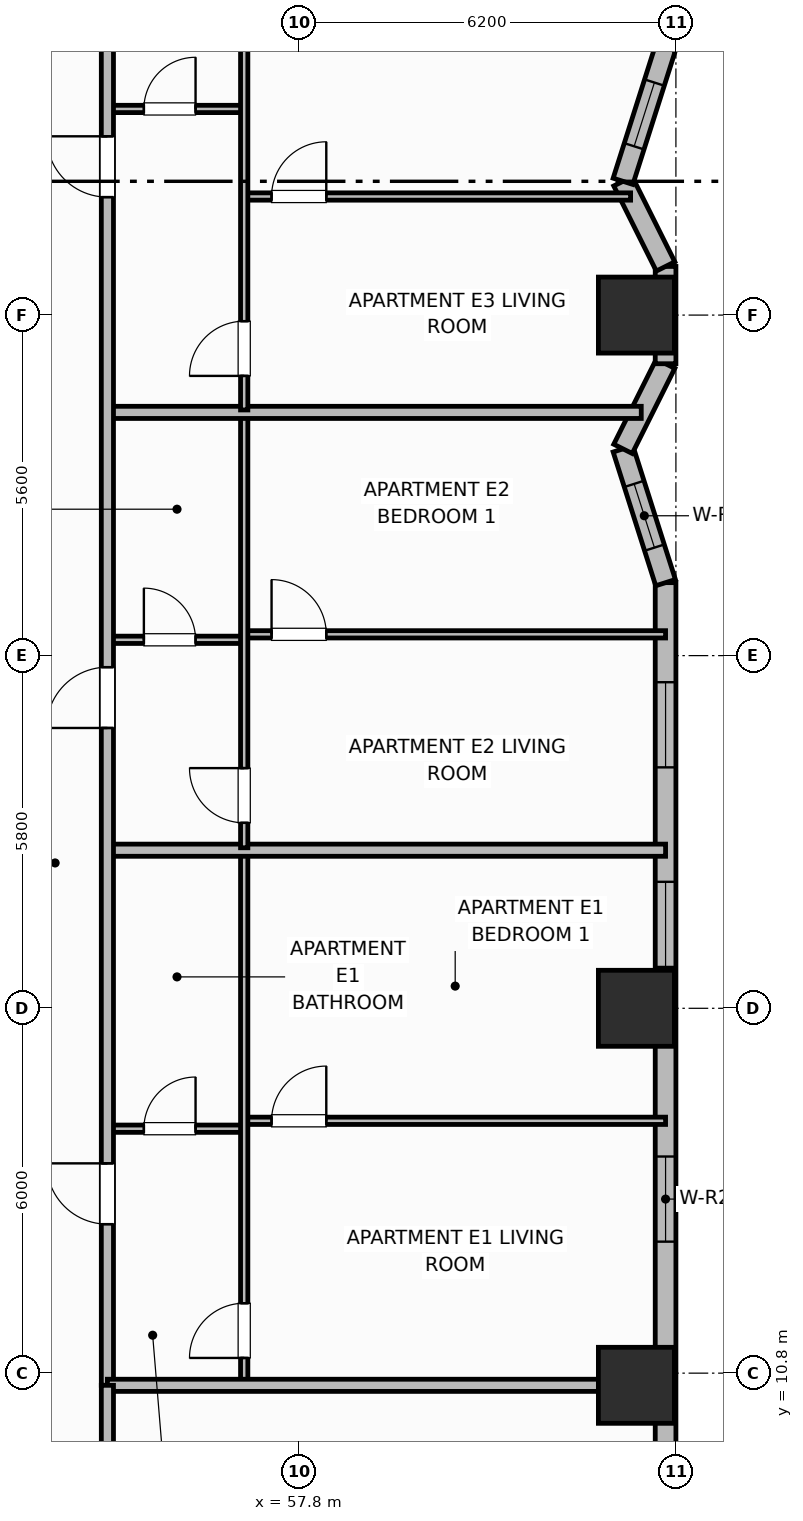
"""IFC4 building model, lengths in metres.
Left out: names, types, materials, properties, quantities, classifications, styles, units other than length and angle.
Written with IfcOpenShell. Run it as: python <this file> out.ifc"""

import sys

from ifc_helpers import new_model, si_unit, direction, frame, frame_2d, origin, origin_2d, place, context, subcontext, project, spatial, rectangle, extrude, element, fill, save


model = new_model("IFC4")
c1 = context("Model", 3, precision=1e-05, world=origin(), true_north=direction((0.0, 1.0)))
c2 = subcontext(c1, "Body", "Model", "MODEL_VIEW")
j1 = project(units=[si_unit("LENGTHUNIT", "METRE"), si_unit("PLANEANGLEUNIT", "RADIAN")], contexts=[c1])
p1 = place(None, origin())
s1 = spatial("IfcSite", under=j1, at=p1, CompositionType="ELEMENT")
p2 = place(p1, origin())
s2 = spatial("IfcBuilding", under=s1, at=p2, CompositionType="ELEMENT")
p3 = place(p2, frame((0.0, 0.0, 65.8)))
s3 = spatial("IfcBuildingStorey", under=s2, at=p3, CompositionType="ELEMENT", Elevation=65.8)
for number, where, z_axis, x_axis in (
    (1, (63.35, 10.6, 0.0), (0.0, 0.0, 1.0), (1.0, 0.0, 0.0)),
    (2, (63.35, 16.8, 0.0), (0.0, 0.0, 1.0), (1.0, 0.0, 0.0)),
    (3, (63.35, 28.2, 0.0), (0.0, 0.0, 1.0), (1.0, 0.0, 0.0)),
):
    element("IfcColumn", number, at=place(p3, frame(where, z_axis=z_axis, x_axis=x_axis)), inside=s3, PredefinedType="COLUMN", context=c2, shape_type="SweptSolid", body=[
        extrude(rectangle(XDim=1.25, YDim=1.25, at=origin_2d()), origin(), (0.0, 0.0, 1.0), 3.7),
    ])
p4 = place(p3, frame((63.83, 9.0, 0.0), z_axis=(0.0, 0.0, 1.0), x_axis=(0.0, 1.0, 0.0)))
e4 = element("IfcWall", 4, at=p4, inside=s3, PredefinedType="SOLIDWALL", context=c2, shape_type="SweptSolid", body=[
    extrude(rectangle(XDim=14.8, YDim=0.34, at=frame_2d((7.4, 0.0))), origin(), (0.0, 0.0, 1.0), 2.7),
])
p5 = place(p4, frame((3.962, 0.0, 0.73)))
e5 = element("IfcOpeningElement", 5, at=p5, cuts=e4, PredefinedType="OPENING", context=c2, shape_type="SweptSolid", body=[
    extrude(rectangle(XDim=1.4, YDim=1.85, at=frame_2d((0.7, 0.925))), frame((0.0, 0.18, 0.0), z_axis=(0.0, -1.0, 0.0), x_axis=(1.0, 0.0, 0.0)), (0.0, 0.0, 1.0), 0.36),
])
p6 = place(p4, frame((8.48, 0.0, 0.69)))
e6 = element("IfcOpeningElement", 6, at=p6, cuts=e4, PredefinedType="OPENING", context=c2, shape_type="SweptSolid", body=[
    extrude(rectangle(XDim=1.4, YDim=1.85, at=frame_2d((0.7, 0.925))), frame((0.0, 0.18, 0.0), z_axis=(0.0, -1.0, 0.0), x_axis=(1.0, 0.0, 0.0)), (0.0, 0.0, 1.0), 0.36),
])
p7 = place(p4, frame((11.762, 0.0, 0.73)))
e7 = element("IfcOpeningElement", 7, at=p7, cuts=e4, PredefinedType="OPENING", context=c2, shape_type="SweptSolid", body=[
    extrude(rectangle(XDim=1.4, YDim=1.85, at=frame_2d((0.7, 0.925))), frame((0.0, 0.18, 0.0), z_axis=(0.0, -1.0, 0.0), x_axis=(1.0, 0.0, 0.0)), (0.0, 0.0, 1.0), 0.36),
])
p8 = place(p3, frame((63.83, 23.8, 0.0), z_axis=(0.0, 0.0, 1.0), x_axis=(-0.303286588318, 0.95289938889, 0.0)))
e8 = element("IfcWall", 8, at=p8, inside=s3, PredefinedType="SOLIDWALL", context=c2, shape_type="SweptSolid", body=[
    extrude(rectangle(XDim=2.309, YDim=0.34, at=frame_2d((1.154, 0.0))), origin(), (0.0, 0.0, 1.0), 2.7),
])
p9 = place(p8, frame((0.604, 0.0, 0.89)))
e9 = element("IfcOpeningElement", 9, at=p9, cuts=e8, PredefinedType="OPENING", context=c2, shape_type="SweptSolid", body=[
    extrude(rectangle(XDim=1.1, YDim=1.65, at=frame_2d((0.55, 0.825))), frame((0.0, 0.18, 0.0), z_axis=(0.0, -1.0, 0.0), x_axis=(1.0, 0.0, 0.0)), (0.0, 0.0, 1.0), 0.36),
])
p10 = place(p3, frame((63.13, 26.0, 0.0), z_axis=(0.0, 0.0, 1.0), x_axis=(0.447338371726, 0.894364792007, 0.0)))
e10 = element("IfcWall", 10, at=p10, inside=s3, PredefinedType="SOLIDWALL", context=c2, shape_type="SweptSolid", body=[
    extrude(rectangle(XDim=1.565, YDim=0.34, at=frame_2d((0.783, 0.0))), origin(), (0.0, 0.0, 1.0), 2.7),
])
p11 = place(p3, frame((63.83, 27.4, 0.0), z_axis=(0.0, 0.0, 1.0), x_axis=(0.0, 1.0, 0.0)))
e11 = element("IfcWall", 11, at=p11, inside=s3, PredefinedType="SOLIDWALL", context=c2, shape_type="SweptSolid", body=[
    extrude(rectangle(XDim=1.6, YDim=0.34, at=frame_2d((0.8, 0.0))), origin(), (0.0, 0.0, 1.0), 2.7),
])
p12 = place(p3, frame((63.83, 29.0, 0.0), z_axis=(0.0, 0.0, 1.0), x_axis=(-0.447338371726, 0.894364792007, 0.0)))
e12 = element("IfcWall", 12, at=p12, inside=s3, PredefinedType="SOLIDWALL", context=c2, shape_type="SweptSolid", body=[
    extrude(rectangle(XDim=1.565, YDim=0.34, at=frame_2d((0.783, 0.0))), origin(), (0.0, 0.0, 1.0), 2.7),
])
p13 = place(p3, frame((63.13, 30.4, 0.0), z_axis=(0.0, 0.0, 1.0), x_axis=(0.303256029766, 0.952909114454, 0.0)))
e13 = element("IfcWall", 13, at=p13, inside=s3, PredefinedType="SOLIDWALL", context=c2, shape_type="SweptSolid", body=[
    extrude(rectangle(XDim=2.309, YDim=0.34, at=frame_2d((1.154, 0.0))), origin(), (0.0, 0.0, 1.0), 2.7),
])
p14 = place(p13, frame((0.604, 0.0, 0.89)))
e14 = element("IfcOpeningElement", 14, at=p14, cuts=e13, PredefinedType="OPENING", context=c2, shape_type="SweptSolid", body=[
    extrude(rectangle(XDim=1.1, YDim=1.65, at=frame_2d((0.55, 0.825))), frame((0.0, 0.18, 0.0), z_axis=(0.0, -1.0, 0.0), x_axis=(1.0, 0.0, 0.0)), (0.0, 0.0, 1.0), 0.36),
])
p15 = place(p3, frame((54.65, 14.82, 0.0), z_axis=(0.0, 0.0, 1.0), x_axis=(1.0, 0.0, 0.0)))
e15 = element("IfcWall", 15, at=p15, inside=s3, PredefinedType="PARTITIONING", context=c2, shape_type="SweptSolid", body=[
    extrude(rectangle(XDim=2.25, YDim=0.12, at=frame_2d((1.125, 0.0))), origin(), (0.0, 0.0, 1.0), 2.53),
])
p16 = place(p15, frame((0.6, 0.0, 0.0)))
e16 = element("IfcOpeningElement", 16, at=p16, cuts=e15, PredefinedType="OPENING", context=c2, shape_type="SweptSolid", body=[
    extrude(rectangle(XDim=0.85, YDim=2.1, at=frame_2d((0.425, 1.05))), frame((0.0, 0.07, 0.0), z_axis=(0.0, -1.0, 0.0), x_axis=(1.0, 0.0, 0.0)), (0.0, 0.0, 1.0), 0.14),
])
p17 = place(p3, frame((56.9, 14.95, 0.0), z_axis=(0.0, 0.0, 1.0), x_axis=(1.0, 0.0, 0.0)))
e17 = element("IfcWall", 17, at=p17, inside=s3, PredefinedType="PARTITIONING", context=c2, shape_type="SweptSolid", body=[
    extrude(rectangle(XDim=6.93, YDim=0.12, at=frame_2d((3.465, 0.0))), origin(), (0.0, 0.0, 1.0), 2.53),
])
p18 = place(p17, frame((0.45, 0.0, 0.0)))
e18 = element("IfcOpeningElement", 18, at=p18, cuts=e17, PredefinedType="OPENING", context=c2, shape_type="SweptSolid", body=[
    extrude(rectangle(XDim=0.9, YDim=2.1, at=frame_2d((0.45, 1.05))), frame((0.0, 0.07, 0.0), z_axis=(0.0, -1.0, 0.0), x_axis=(1.0, 0.0, 0.0)), (0.0, 0.0, 1.0), 0.14),
])
p19 = place(p3, frame((56.9, 10.64, 0.0), z_axis=(0.0, 0.0, 1.0), x_axis=(0.0, 1.0, 0.0)))
e19 = element("IfcWall", 19, at=p19, inside=s3, PredefinedType="PARTITIONING", context=c2, shape_type="SweptSolid", body=[
    extrude(rectangle(XDim=8.72, YDim=0.12, at=frame_2d((4.36, 0.0))), origin(), (0.0, 0.0, 1.0), 2.53),
])
p20 = place(p19, frame((0.41, 0.0, 0.0)))
e20 = element("IfcOpeningElement", 20, at=p20, cuts=e19, PredefinedType="OPENING", context=c2, shape_type="SweptSolid", body=[
    extrude(rectangle(XDim=0.9, YDim=2.1, at=frame_2d((0.45, 1.05))), frame((0.0, 0.07, 0.0), z_axis=(0.0, -1.0, 0.0), x_axis=(1.0, 0.0, 0.0)), (0.0, 0.0, 1.0), 0.14),
])
p21 = place(p3, frame((54.65, 19.4, 0.0), z_axis=(0.0, 0.0, 1.0), x_axis=(1.0, 0.0, 0.0)))
e21 = element("IfcWall", 21, at=p21, inside=s3, PredefinedType="PARTITIONING", context=c2, shape_type="SweptSolid", body=[
    extrude(rectangle(XDim=9.18, YDim=0.2, at=frame_2d((4.59, 0.0))), origin(), (0.0, 0.0, 1.0), 2.53),
])
p22 = place(p3, frame((54.65, 22.86, 0.0), z_axis=(0.0, 0.0, 1.0), x_axis=(1.0, 0.0, 0.0)))
e22 = element("IfcWall", 22, at=p22, inside=s3, PredefinedType="PARTITIONING", context=c2, shape_type="SweptSolid", body=[
    extrude(rectangle(XDim=2.25, YDim=0.12, at=frame_2d((1.125, 0.0))), origin(), (0.0, 0.0, 1.0), 2.53),
])
p23 = place(p22, frame((0.6, 0.0, 0.0)))
e23 = element("IfcOpeningElement", 23, at=p23, cuts=e22, PredefinedType="OPENING", context=c2, shape_type="SweptSolid", body=[
    extrude(rectangle(XDim=0.85, YDim=2.1, at=frame_2d((0.425, 1.05))), frame((0.0, 0.07, 0.0), z_axis=(0.0, -1.0, 0.0), x_axis=(1.0, 0.0, 0.0)), (0.0, 0.0, 1.0), 0.14),
])
p24 = place(p3, frame((56.9, 22.95, 0.0), z_axis=(0.0, 0.0, 1.0), x_axis=(1.0, 0.0, 0.0)))
e24 = element("IfcWall", 24, at=p24, inside=s3, PredefinedType="PARTITIONING", context=c2, shape_type="SweptSolid", body=[
    extrude(rectangle(XDim=6.93, YDim=0.12, at=frame_2d((3.465, 0.0))), origin(), (0.0, 0.0, 1.0), 2.53),
])
p25 = place(p24, frame((0.45, 0.0, 0.0)))
e25 = element("IfcOpeningElement", 25, at=p25, cuts=e24, PredefinedType="OPENING", context=c2, shape_type="SweptSolid", body=[
    extrude(rectangle(XDim=0.9, YDim=2.1, at=frame_2d((0.45, 1.05))), frame((0.0, 0.07, 0.0), z_axis=(0.0, -1.0, 0.0), x_axis=(1.0, 0.0, 0.0)), (0.0, 0.0, 1.0), 0.14),
])
p26 = place(p3, frame((56.9, 19.44, 0.0), z_axis=(0.0, 0.0, 1.0), x_axis=(0.0, 1.0, 0.0)))
e26 = element("IfcWall", 26, at=p26, inside=s3, PredefinedType="PARTITIONING", context=c2, shape_type="SweptSolid", body=[
    extrude(rectangle(XDim=7.12, YDim=0.12, at=frame_2d((3.56, 0.0))), origin(), (0.0, 0.0, 1.0), 2.53),
])
p27 = place(p26, frame((0.41, 0.0, 0.0)))
e27 = element("IfcOpeningElement", 27, at=p27, cuts=e26, PredefinedType="OPENING", context=c2, shape_type="SweptSolid", body=[
    extrude(rectangle(XDim=0.9, YDim=2.1, at=frame_2d((0.45, 1.05))), frame((0.0, 0.07, 0.0), z_axis=(0.0, -1.0, 0.0), x_axis=(1.0, 0.0, 0.0)), (0.0, 0.0, 1.0), 0.14),
])
p28 = place(p3, frame((54.65, 26.6, 0.0), z_axis=(0.0, 0.0, 1.0), x_axis=(1.0, 0.0, 0.0)))
e28 = element("IfcWall", 28, at=p28, inside=s3, PredefinedType="PARTITIONING", context=c2, shape_type="SweptSolid", body=[
    extrude(rectangle(XDim=8.78, YDim=0.2, at=frame_2d((4.39, 0.0))), origin(), (0.0, 0.0, 1.0), 2.53),
])
p29 = place(p3, frame((54.65, 31.59, 0.0), z_axis=(0.0, 0.0, 1.0), x_axis=(1.0, 0.0, 0.0)))
e29 = element("IfcWall", 29, at=p29, inside=s3, PredefinedType="PARTITIONING", context=c2, shape_type="SweptSolid", body=[
    extrude(rectangle(XDim=2.25, YDim=0.12, at=frame_2d((1.125, 0.0))), origin(), (0.0, 0.0, 1.0), 2.53),
])
p30 = place(p29, frame((0.6, 0.0, 0.0)))
e30 = element("IfcOpeningElement", 30, at=p30, cuts=e29, PredefinedType="OPENING", context=c2, shape_type="SweptSolid", body=[
    extrude(rectangle(XDim=0.85, YDim=2.1, at=frame_2d((0.425, 1.05))), frame((0.0, 0.07, 0.0), z_axis=(0.0, -1.0, 0.0), x_axis=(1.0, 0.0, 0.0)), (0.0, 0.0, 1.0), 0.14),
])
p31 = place(p3, frame((56.9, 30.15, 0.0), z_axis=(0.0, 0.0, 1.0), x_axis=(1.0, 0.0, 0.0)))
e31 = element("IfcWall", 31, at=p31, inside=s3, PredefinedType="PARTITIONING", context=c2, shape_type="SweptSolid", body=[
    extrude(rectangle(XDim=6.355, YDim=0.12, at=frame_2d((3.177, 0.0))), origin(), (0.0, 0.0, 1.0), 2.53),
])
p32 = place(p31, frame((0.45, 0.0, 0.0)))
e32 = element("IfcOpeningElement", 32, at=p32, cuts=e31, PredefinedType="OPENING", context=c2, shape_type="SweptSolid", body=[
    extrude(rectangle(XDim=0.9, YDim=2.1, at=frame_2d((0.45, 1.05))), frame((0.0, 0.07, 0.0), z_axis=(0.0, -1.0, 0.0), x_axis=(1.0, 0.0, 0.0)), (0.0, 0.0, 1.0), 0.14),
])
p33 = place(p3, frame((56.9, 26.64, 0.0), z_axis=(0.0, 0.0, 1.0), x_axis=(0.0, 1.0, 0.0)))
e33 = element("IfcWall", 33, at=p33, inside=s3, PredefinedType="PARTITIONING", context=c2, shape_type="SweptSolid", body=[
    extrude(rectangle(XDim=10.32, YDim=0.12, at=frame_2d((5.16, 0.0))), origin(), (0.0, 0.0, 1.0), 2.53),
])
p34 = place(p33, frame((0.56, 0.0, 0.0)))
e34 = element("IfcOpeningElement", 34, at=p34, cuts=e33, PredefinedType="OPENING", context=c2, shape_type="SweptSolid", body=[
    extrude(rectangle(XDim=0.9, YDim=2.1, at=frame_2d((0.45, 1.05))), frame((0.0, 0.07, 0.0), z_axis=(0.0, -1.0, 0.0), x_axis=(1.0, 0.0, 0.0)), (0.0, 0.0, 1.0), 0.14),
])
p35 = place(p3, frame((54.65, 10.6, 0.0), z_axis=(0.0, 0.0, 1.0), x_axis=(0.0, 1.0, 0.0)))
e35 = element("IfcWall", 35, at=p35, inside=s3, PredefinedType="PARTITIONING", context=c2, shape_type="SweptSolid", body=[
    extrude(rectangle(XDim=35.2, YDim=0.2, at=frame_2d((17.6, 0.0))), origin(), (0.0, 0.0, 1.0), 2.53),
])
p36 = place(p35, frame((2.65, 0.0, 0.0)))
e36 = element("IfcOpeningElement", 36, at=p36, cuts=e35, PredefinedType="OPENING", context=c2, shape_type="SweptSolid", body=[
    extrude(rectangle(XDim=1.0, YDim=2.15, at=frame_2d((0.5, 1.075))), frame((0.0, 0.11, 0.0), z_axis=(0.0, -1.0, 0.0), x_axis=(1.0, 0.0, 0.0)), (0.0, 0.0, 1.0), 0.22),
])
p37 = place(p35, frame((10.81, 0.0, 0.0)))
e37 = element("IfcOpeningElement", 37, at=p37, cuts=e35, PredefinedType="OPENING", context=c2, shape_type="SweptSolid", body=[
    extrude(rectangle(XDim=1.0, YDim=2.15, at=frame_2d((0.5, 1.075))), frame((0.0, 0.11, 0.0), z_axis=(0.0, -1.0, 0.0), x_axis=(1.0, 0.0, 0.0)), (0.0, 0.0, 1.0), 0.22),
])
p38 = place(p35, frame((19.54, 0.0, 0.0)))
e38 = element("IfcOpeningElement", 38, at=p38, cuts=e35, PredefinedType="OPENING", context=c2, shape_type="SweptSolid", body=[
    extrude(rectangle(XDim=1.0, YDim=2.15, at=frame_2d((0.5, 1.075))), frame((0.0, 0.11, 0.0), z_axis=(0.0, -1.0, 0.0), x_axis=(1.0, 0.0, 0.0)), (0.0, 0.0, 1.0), 0.22),
])
p39 = place(p35, frame((26.95, 0.0, 0.0)))
e39 = element("IfcOpeningElement", 39, at=p39, cuts=e35, PredefinedType="OPENING", context=c2, shape_type="SweptSolid", body=[
    extrude(rectangle(XDim=1.0, YDim=2.15, at=frame_2d((0.5, 1.075))), frame((0.0, 0.11, 0.0), z_axis=(0.0, -1.0, 0.0), x_axis=(1.0, 0.0, 0.0)), (0.0, 0.0, 1.0), 0.22),
])
p40 = place(p3, frame((54.65, 10.6, 0.0), z_axis=(0.0, 0.0, 1.0), x_axis=(1.0, 0.0, 0.0)))
e40 = element("IfcWall", 40, at=p40, inside=s3, PredefinedType="PARTITIONING", context=c2, shape_type="SweptSolid", body=[
    extrude(rectangle(XDim=8.76, YDim=0.2, at=frame_2d((4.38, 0.0))), origin(), (0.0, 0.0, 1.0), 2.53),
])
p41 = place(p3, frame((54.65, 4.97, 0.0), z_axis=(0.0, 0.0, 1.0), x_axis=(0.0, 1.0, 0.0)))
e41 = element("IfcWall", 41, at=p41, inside=s3, PredefinedType="PARTITIONING", context=c2, shape_type="SweptSolid", body=[
    extrude(rectangle(XDim=5.63, YDim=0.2, at=frame_2d((2.815, 0.0))), origin(), (0.0, 0.0, 1.0), 2.53),
])
p42 = place(p5, origin())
e42 = element("IfcWindow", 42, at=p42, inside=s3, PartitioningType="SINGLE_PANEL", PredefinedType="WINDOW", context=c2, shape_type="SweptSolid", body=[
    extrude(rectangle(XDim=1.4, YDim=1.85, at=frame_2d((0.7, 0.925))), frame((0.0, 0.03, 0.0), z_axis=(0.0, -1.0, 0.0), x_axis=(1.0, 0.0, 0.0)), (0.0, 0.0, 1.0), 0.06),
])
fill(e5, e42)
p43 = place(p6, origin())
e43 = element("IfcWindow", 43, at=p43, inside=s3, PartitioningType="SINGLE_PANEL", PredefinedType="WINDOW", context=c2, shape_type="SweptSolid", body=[
    extrude(rectangle(XDim=1.4, YDim=1.85, at=frame_2d((0.7, 0.925))), frame((0.0, 0.03, 0.0), z_axis=(0.0, -1.0, 0.0), x_axis=(1.0, 0.0, 0.0)), (0.0, 0.0, 1.0), 0.06),
])
fill(e6, e43)
p44 = place(p7, origin())
e44 = element("IfcWindow", 44, at=p44, inside=s3, PartitioningType="SINGLE_PANEL", PredefinedType="WINDOW", context=c2, shape_type="SweptSolid", body=[
    extrude(rectangle(XDim=1.4, YDim=1.85, at=frame_2d((0.7, 0.925))), frame((0.0, 0.03, 0.0), z_axis=(0.0, -1.0, 0.0), x_axis=(1.0, 0.0, 0.0)), (0.0, 0.0, 1.0), 0.06),
])
fill(e7, e44)
p45 = place(p9, origin())
e45 = element("IfcWindow", 45, at=p45, inside=s3, PartitioningType="SINGLE_PANEL", PredefinedType="WINDOW", context=c2, shape_type="SweptSolid", body=[
    extrude(rectangle(XDim=1.1, YDim=1.65, at=frame_2d((0.55, 0.825))), frame((0.0, 0.03, 0.0), z_axis=(0.0, -1.0, 0.0), x_axis=(1.0, 0.0, 0.0)), (0.0, 0.0, 1.0), 0.06),
])
fill(e9, e45)
p46 = place(p14, origin())
e46 = element("IfcWindow", 46, at=p46, inside=s3, PartitioningType="SINGLE_PANEL", PredefinedType="WINDOW", context=c2, shape_type="SweptSolid", body=[
    extrude(rectangle(XDim=1.1, YDim=1.65, at=frame_2d((0.55, 0.825))), frame((0.0, 0.03, 0.0), z_axis=(0.0, -1.0, 0.0), x_axis=(1.0, 0.0, 0.0)), (0.0, 0.0, 1.0), 0.06),
])
fill(e14, e46)
p47 = place(p16, origin())
e47 = element("IfcDoor", 47, at=p47, inside=s3, OperationType="SINGLE_SWING_RIGHT", PredefinedType="DOOR", context=c2, shape_type="SweptSolid", body=[
    extrude(rectangle(XDim=0.85, YDim=2.1, at=frame_2d((0.425, 1.05))), frame((0.0, 0.025, 0.0), z_axis=(0.0, -1.0, 0.0), x_axis=(1.0, 0.0, 0.0)), (0.0, 0.0, 1.0), 0.05),
])
fill(e16, e47)
p48 = place(p18, origin())
e48 = element("IfcDoor", 48, at=p48, inside=s3, OperationType="SINGLE_SWING_RIGHT", PredefinedType="DOOR", context=c2, shape_type="SweptSolid", body=[
    extrude(rectangle(XDim=0.9, YDim=2.1, at=frame_2d((0.45, 1.05))), frame((0.0, 0.025, 0.0), z_axis=(0.0, -1.0, 0.0), x_axis=(1.0, 0.0, 0.0)), (0.0, 0.0, 1.0), 0.05),
])
fill(e18, e48)
p49 = place(p20, origin())
e49 = element("IfcDoor", 49, at=p49, inside=s3, OperationType="SINGLE_SWING_LEFT", PredefinedType="DOOR", context=c2, shape_type="SweptSolid", body=[
    extrude(rectangle(XDim=0.9, YDim=2.1, at=frame_2d((0.45, 1.05))), frame((0.0, 0.025, 0.0), z_axis=(0.0, -1.0, 0.0), x_axis=(1.0, 0.0, 0.0)), (0.0, 0.0, 1.0), 0.05),
])
fill(e20, e49)
p50 = place(p23, origin())
e50 = element("IfcDoor", 50, at=p50, inside=s3, OperationType="SINGLE_SWING_LEFT", PredefinedType="DOOR", context=c2, shape_type="SweptSolid", body=[
    extrude(rectangle(XDim=0.85, YDim=2.1, at=frame_2d((0.425, 1.05))), frame((0.0, 0.025, 0.0), z_axis=(0.0, -1.0, 0.0), x_axis=(1.0, 0.0, 0.0)), (0.0, 0.0, 1.0), 0.05),
])
fill(e23, e50)
p51 = place(p25, origin())
e51 = element("IfcDoor", 51, at=p51, inside=s3, OperationType="SINGLE_SWING_LEFT", PredefinedType="DOOR", context=c2, shape_type="SweptSolid", body=[
    extrude(rectangle(XDim=0.9, YDim=2.1, at=frame_2d((0.45, 1.05))), frame((0.0, 0.025, 0.0), z_axis=(0.0, -1.0, 0.0), x_axis=(1.0, 0.0, 0.0)), (0.0, 0.0, 1.0), 0.05),
])
fill(e25, e51)
p52 = place(p27, origin())
e52 = element("IfcDoor", 52, at=p52, inside=s3, OperationType="SINGLE_SWING_RIGHT", PredefinedType="DOOR", context=c2, shape_type="SweptSolid", body=[
    extrude(rectangle(XDim=0.9, YDim=2.1, at=frame_2d((0.45, 1.05))), frame((0.0, 0.025, 0.0), z_axis=(0.0, -1.0, 0.0), x_axis=(1.0, 0.0, 0.0)), (0.0, 0.0, 1.0), 0.05),
])
fill(e27, e52)
p53 = place(p30, origin())
e53 = element("IfcDoor", 53, at=p53, inside=s3, OperationType="SINGLE_SWING_RIGHT", PredefinedType="DOOR", context=c2, shape_type="SweptSolid", body=[
    extrude(rectangle(XDim=0.85, YDim=2.1, at=frame_2d((0.425, 1.05))), frame((0.0, 0.025, 0.0), z_axis=(0.0, -1.0, 0.0), x_axis=(1.0, 0.0, 0.0)), (0.0, 0.0, 1.0), 0.05),
])
fill(e30, e53)
p54 = place(p32, origin())
e54 = element("IfcDoor", 54, at=p54, inside=s3, OperationType="SINGLE_SWING_RIGHT", PredefinedType="DOOR", context=c2, shape_type="SweptSolid", body=[
    extrude(rectangle(XDim=0.9, YDim=2.1, at=frame_2d((0.45, 1.05))), frame((0.0, 0.025, 0.0), z_axis=(0.0, -1.0, 0.0), x_axis=(1.0, 0.0, 0.0)), (0.0, 0.0, 1.0), 0.05),
])
fill(e32, e54)
p55 = place(p34, origin())
e55 = element("IfcDoor", 55, at=p55, inside=s3, OperationType="SINGLE_SWING_LEFT", PredefinedType="DOOR", context=c2, shape_type="SweptSolid", body=[
    extrude(rectangle(XDim=0.9, YDim=2.1, at=frame_2d((0.45, 1.05))), frame((0.0, 0.025, 0.0), z_axis=(0.0, -1.0, 0.0), x_axis=(1.0, 0.0, 0.0)), (0.0, 0.0, 1.0), 0.05),
])
fill(e34, e55)
p56 = place(p36, origin())
e56 = element("IfcDoor", 56, at=p56, inside=s3, OperationType="SINGLE_SWING_RIGHT", PredefinedType="DOOR", context=c2, shape_type="SweptSolid", body=[
    extrude(rectangle(XDim=1.0, YDim=2.15, at=frame_2d((0.5, 1.075))), frame((0.0, 0.025, 0.0), z_axis=(0.0, -1.0, 0.0), x_axis=(1.0, 0.0, 0.0)), (0.0, 0.0, 1.0), 0.05),
])
fill(e36, e56)
p57 = place(p37, origin())
e57 = element("IfcDoor", 57, at=p57, inside=s3, OperationType="SINGLE_SWING_LEFT", PredefinedType="DOOR", context=c2, shape_type="SweptSolid", body=[
    extrude(rectangle(XDim=1.0, YDim=2.15, at=frame_2d((0.5, 1.075))), frame((0.0, 0.025, 0.0), z_axis=(0.0, -1.0, 0.0), x_axis=(1.0, 0.0, 0.0)), (0.0, 0.0, 1.0), 0.05),
])
fill(e37, e57)
p58 = place(p38, origin())
e58 = element("IfcDoor", 58, at=p58, inside=s3, OperationType="SINGLE_SWING_RIGHT", PredefinedType="DOOR", context=c2, shape_type="SweptSolid", body=[
    extrude(rectangle(XDim=1.0, YDim=2.15, at=frame_2d((0.5, 1.075))), frame((0.0, 0.025, 0.0), z_axis=(0.0, -1.0, 0.0), x_axis=(1.0, 0.0, 0.0)), (0.0, 0.0, 1.0), 0.05),
])
fill(e38, e58)
save(model, sys.argv[1])
